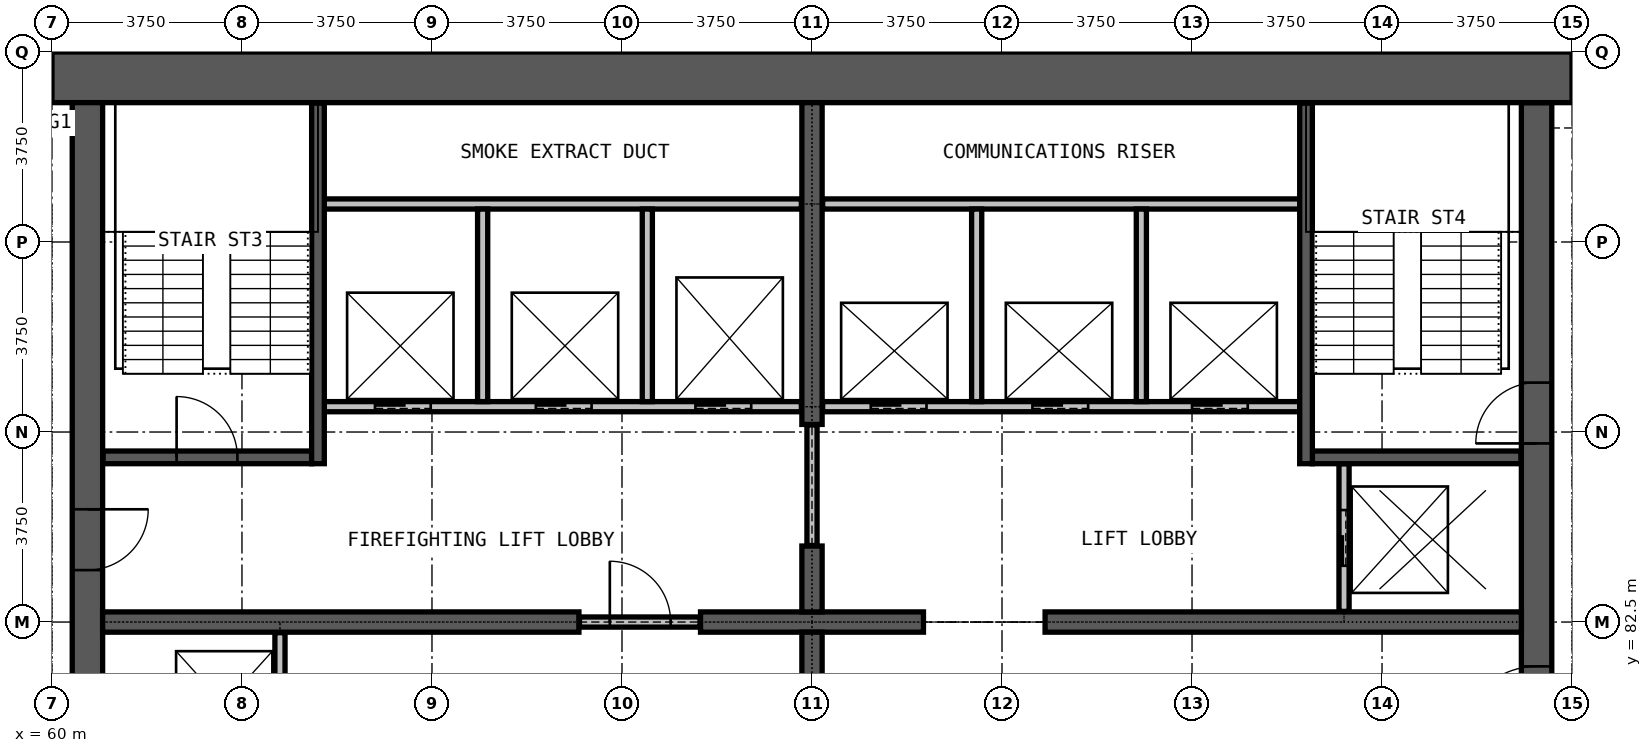
"""IFC4 building model, lengths in metres.
Left out: names, types, materials, properties, quantities, classifications, styles, units other than length and angle.
Written with IfcOpenShell. Run it as: python <this file> out.ifc"""

import sys

from ifc_helpers import new_model, si_unit, direction, frame, frame_2d, origin, place, context, subcontext, project, spatial, rectangle, extrude, element, fill, save


model = new_model("IFC4")
c1 = context("Model", 3, precision=1e-05, world=origin(), true_north=direction((0.0, 1.0)))
c2 = subcontext(c1, "Body", "Model", "MODEL_VIEW")
j1 = project(units=[si_unit("LENGTHUNIT", "METRE"), si_unit("PLANEANGLEUNIT", "RADIAN")], contexts=[c1])
p1 = place(None, origin())
s1 = spatial("IfcSite", under=j1, at=p1, CompositionType="ELEMENT")
p2 = place(p1, origin())
s2 = spatial("IfcBuilding", under=s1, at=p2, CompositionType="ELEMENT")
p3 = place(p2, frame((0.0, 0.0, 246.3)))
s3 = spatial("IfcBuildingStorey", under=s2, at=p3, CompositionType="ELEMENT", Elevation=246.3)
p4 = place(p3, frame((89.3, 72.25, 0.0), z_axis=(0.0, 0.0, 1.0), x_axis=(0.0, 1.0, 0.0)))
e1 = element("IfcWall", 1, at=p4, inside=s3, PredefinedType="SHEAR", context=c2, shape_type="SweptSolid", body=[
    extrude(rectangle(XDim=20.5, YDim=0.6, at=frame_2d((10.25, 0.0))), origin(), (0.0, 0.0, 1.0), 3.6),
])
p5 = place(p4, frame((0.275, 0.0, 0.0)))
e2 = element("IfcOpeningElement", 2, at=p5, cuts=e1, PredefinedType="OPENING", context=c2, shape_type="SweptSolid", body=[
    extrude(rectangle(XDim=1.2, YDim=2.2, at=frame_2d((0.6, 1.1))), frame((0.0, 0.31, 0.0), z_axis=(0.0, -1.0, 0.0), x_axis=(1.0, 0.0, 0.0)), (0.0, 0.0, 1.0), 0.62),
])
p6 = place(p4, frame((13.775, 0.0, 0.0)))
e3 = element("IfcOpeningElement", 3, at=p6, cuts=e1, PredefinedType="OPENING", context=c2, shape_type="SweptSolid", body=[
    extrude(rectangle(XDim=1.2, YDim=2.2, at=frame_2d((0.6, 1.1))), frame((0.0, 0.31, 0.0), z_axis=(0.0, -1.0, 0.0), x_axis=(1.0, 0.0, 0.0)), (0.0, 0.0, 1.0), 0.62),
])
p7 = place(p4, frame((7.875, 0.0, 0.0)))
e4 = element("IfcOpeningElement", 4, at=p7, cuts=e1, PredefinedType="OPENING", context=c2, shape_type="SweptSolid", body=[
    extrude(rectangle(XDim=1.5, YDim=2.2, at=frame_2d((0.75, 1.1))), frame((0.0, 0.31, 0.0), z_axis=(0.0, -1.0, 0.0), x_axis=(1.0, 0.0, 0.0)), (0.0, 0.0, 1.0), 0.62),
])
p8 = place(p3, frame((90.0, 93.25, 0.0), z_axis=(0.0, 0.0, 1.0), x_axis=(-1.0, 0.0, 0.0)))
e5 = element("IfcWall", 5, at=p8, inside=s3, PredefinedType="SHEAR", context=c2, shape_type="SweptSolid", body=[
    extrude(rectangle(XDim=30.0, YDim=1.0, at=frame_2d((15.0, 0.0))), origin(), (0.0, 0.0, 1.0), 3.6),
])
p9 = place(p3, frame((60.7, 92.75, 0.0), z_axis=(0.0, 0.0, 1.0), x_axis=(0.0, -1.0, 0.0)))
e6 = element("IfcWall", 6, at=p9, inside=s3, PredefinedType="SHEAR", context=c2, shape_type="SweptSolid", body=[
    extrude(rectangle(XDim=20.5, YDim=0.6, at=frame_2d((10.25, 0.0))), origin(), (0.0, 0.0, 1.0), 3.6),
])
p10 = place(p9, frame((19.025, 0.0, 0.0)))
e7 = element("IfcOpeningElement", 7, at=p10, cuts=e6, PredefinedType="OPENING", context=c2, shape_type="SweptSolid", body=[
    extrude(rectangle(XDim=1.2, YDim=2.2, at=frame_2d((0.6, 1.1))), frame((0.0, 0.31, 0.0), z_axis=(0.0, -1.0, 0.0), x_axis=(1.0, 0.0, 0.0)), (0.0, 0.0, 1.0), 0.62),
])
p11 = place(p9, frame((8.025, 0.0, 0.0)))
e8 = element("IfcOpeningElement", 8, at=p11, cuts=e6, PredefinedType="OPENING", context=c2, shape_type="SweptSolid", body=[
    extrude(rectangle(XDim=1.2, YDim=2.2, at=frame_2d((0.6, 1.1))), frame((0.0, 0.31, 0.0), z_axis=(0.0, -1.0, 0.0), x_axis=(1.0, 0.0, 0.0)), (0.0, 0.0, 1.0), 0.62),
])
p12 = place(p3, frame((61.0, 82.5, 0.0), z_axis=(0.0, 0.0, 1.0), x_axis=(1.0, 0.0, 0.0)))
e9 = element("IfcWall", 9, at=p12, inside=s3, PredefinedType="SHEAR", context=c2, shape_type="SweptSolid", body=[
    extrude(rectangle(XDim=9.4, YDim=0.4, at=frame_2d((4.7, 0.0))), origin(), (0.0, 0.0, 1.0), 3.6),
])
p13 = place(p3, frame((72.8, 82.5, 0.0), z_axis=(0.0, 0.0, 1.0), x_axis=(1.0, 0.0, 0.0)))
e10 = element("IfcWall", 10, at=p13, inside=s3, PredefinedType="SHEAR", context=c2, shape_type="SweptSolid", body=[
    extrude(rectangle(XDim=4.4, YDim=0.4, at=frame_2d((2.2, 0.0))), origin(), (0.0, 0.0, 1.0), 3.6),
])
p14 = place(p3, frame((79.6, 82.5, 0.0), z_axis=(0.0, 0.0, 1.0), x_axis=(1.0, 0.0, 0.0)))
e11 = element("IfcWall", 11, at=p14, inside=s3, PredefinedType="SHEAR", context=c2, shape_type="SweptSolid", body=[
    extrude(rectangle(XDim=9.4, YDim=0.4, at=frame_2d((4.7, 0.0))), origin(), (0.0, 0.0, 1.0), 3.6),
])
for number, where, z_axis, x_axis in (
    (12, (75.0, 81.0, 0.0), (0.0, 0.0, 1.0), (0.0, 1.0, 0.0)),
    (13, (75.0, 82.7, 0.0), (0.0, 0.0, 1.0), (0.0, 1.0, 0.0)),
):
    element("IfcWall", number, at=place(p3, frame(where, z_axis=z_axis, x_axis=x_axis)), inside=s3, PredefinedType="SHEAR", context=c2, shape_type="SweptSolid", body=[
        extrude(rectangle(XDim=1.3, YDim=0.4, at=frame_2d((0.65, 0.0))), origin(), (0.0, 0.0, 1.0), 3.6),
    ])
p15 = place(p3, frame((75.0, 86.4, 0.0), z_axis=(0.0, 0.0, 1.0), x_axis=(0.0, 1.0, 0.0)))
e14 = element("IfcWall", 14, at=p15, inside=s3, PredefinedType="SHEAR", context=c2, shape_type="SweptSolid", body=[
    extrude(rectangle(XDim=6.35, YDim=0.4, at=frame_2d((3.175, 0.0))), origin(), (0.0, 0.0, 1.0), 3.6),
])
p16 = place(p3, frame((70.41, 82.5, 0.0), z_axis=(0.0, 0.0, 1.0), x_axis=(1.0, 0.0, 0.0)))
e15 = element("IfcWall", 15, at=p16, inside=s3, PredefinedType="PARTITIONING", context=c2, shape_type="SweptSolid", body=[
    extrude(rectangle(XDim=2.38, YDim=0.2, at=frame_2d((1.19, 0.0))), origin(), (0.0, 0.0, 1.0), 2.4),
])
p17 = place(p16, frame((0.6, 0.0, 0.0)))
e16 = element("IfcOpeningElement", 16, at=p17, cuts=e15, PredefinedType="OPENING", context=c2, shape_type="SweptSolid", body=[
    extrude(rectangle(XDim=1.2, YDim=2.2, at=frame_2d((0.6, 1.1))), frame((0.0, 0.11, 0.0), z_axis=(0.0, -1.0, 0.0), x_axis=(1.0, 0.0, 0.0)), (0.0, 0.0, 1.0), 0.22),
])
p18 = place(p3, frame((75.0, 84.01, 0.0), z_axis=(0.0, 0.0, 1.0), x_axis=(0.0, 1.0, 0.0)))
e17 = element("IfcWall", 17, at=p18, inside=s3, PredefinedType="PARTITIONING", context=c2, shape_type="SweptSolid", body=[
    extrude(rectangle(XDim=2.38, YDim=0.2, at=frame_2d((1.19, 0.0))), origin(), (0.0, 0.0, 1.0), 2.4),
])
p19 = place(p3, frame((65.375, 86.75, 0.0), z_axis=(0.0, 0.0, 1.0), x_axis=(1.0, 0.0, 0.0)))
e18 = element("IfcWall", 18, at=p19, inside=s3, PredefinedType="PARTITIONING", context=c2, shape_type="SweptSolid", body=[
    extrude(rectangle(XDim=9.415, YDim=0.2, at=frame_2d((4.708, 0.0))), origin(), (0.0, 0.0, 1.0), 3.3),
])
p20 = place(p19, frame((1.0, 0.0, 0.0)))
e19 = element("IfcOpeningElement", 19, at=p20, cuts=e18, PredefinedType="OPENING", context=c2, shape_type="SweptSolid", body=[
    extrude(rectangle(XDim=1.1, YDim=2.2, at=frame_2d((0.55, 1.1))), frame((0.0, 0.11, 0.0), z_axis=(0.0, -1.0, 0.0), x_axis=(1.0, 0.0, 0.0)), (0.0, 0.0, 1.0), 0.22),
])
p21 = place(p19, frame((4.175, 0.0, 0.0)))
e20 = element("IfcOpeningElement", 20, at=p21, cuts=e18, PredefinedType="OPENING", context=c2, shape_type="SweptSolid", body=[
    extrude(rectangle(XDim=1.1, YDim=2.2, at=frame_2d((0.55, 1.1))), frame((0.0, 0.11, 0.0), z_axis=(0.0, -1.0, 0.0), x_axis=(1.0, 0.0, 0.0)), (0.0, 0.0, 1.0), 0.22),
])
p22 = place(p19, frame((7.325, 0.0, 0.0)))
e21 = element("IfcOpeningElement", 21, at=p22, cuts=e18, PredefinedType="OPENING", context=c2, shape_type="SweptSolid", body=[
    extrude(rectangle(XDim=1.1, YDim=2.2, at=frame_2d((0.55, 1.1))), frame((0.0, 0.11, 0.0), z_axis=(0.0, -1.0, 0.0), x_axis=(1.0, 0.0, 0.0)), (0.0, 0.0, 1.0), 0.22),
])
p23 = place(p3, frame((75.21, 86.75, 0.0), z_axis=(0.0, 0.0, 1.0), x_axis=(1.0, 0.0, 0.0)))
e22 = element("IfcWall", 22, at=p23, inside=s3, PredefinedType="PARTITIONING", context=c2, shape_type="SweptSolid", body=[
    extrude(rectangle(XDim=9.415, YDim=0.2, at=frame_2d((4.708, 0.0))), origin(), (0.0, 0.0, 1.0), 3.3),
])
p24 = place(p23, frame((0.95, 0.0, 0.0)))
e23 = element("IfcOpeningElement", 23, at=p24, cuts=e22, PredefinedType="OPENING", context=c2, shape_type="SweptSolid", body=[
    extrude(rectangle(XDim=1.1, YDim=2.2, at=frame_2d((0.55, 1.1))), frame((0.0, 0.11, 0.0), z_axis=(0.0, -1.0, 0.0), x_axis=(1.0, 0.0, 0.0)), (0.0, 0.0, 1.0), 0.22),
])
p25 = place(p23, frame((4.14, 0.0, 0.0)))
e24 = element("IfcOpeningElement", 24, at=p25, cuts=e22, PredefinedType="OPENING", context=c2, shape_type="SweptSolid", body=[
    extrude(rectangle(XDim=1.1, YDim=2.2, at=frame_2d((0.55, 1.1))), frame((0.0, 0.11, 0.0), z_axis=(0.0, -1.0, 0.0), x_axis=(1.0, 0.0, 0.0)), (0.0, 0.0, 1.0), 0.22),
])
p26 = place(p23, frame((7.29, 0.0, 0.0)))
e25 = element("IfcOpeningElement", 25, at=p26, cuts=e22, PredefinedType="OPENING", context=c2, shape_type="SweptSolid", body=[
    extrude(rectangle(XDim=1.1, YDim=2.2, at=frame_2d((0.55, 1.1))), frame((0.0, 0.11, 0.0), z_axis=(0.0, -1.0, 0.0), x_axis=(1.0, 0.0, 0.0)), (0.0, 0.0, 1.0), 0.22),
])
for number, where, z_axis, x_axis in (
    (26, (65.375, 90.75, 0.0), (0.0, 0.0, 1.0), (1.0, 0.0, 0.0)),
    (27, (75.21, 90.75, 0.0), (0.0, 0.0, 1.0), (1.0, 0.0, 0.0)),
):
    element("IfcWall", number, at=place(p3, frame(where, z_axis=z_axis, x_axis=x_axis)), inside=s3, PredefinedType="PARTITIONING", context=c2, shape_type="SweptSolid", body=[
        extrude(rectangle(XDim=9.415, YDim=0.2, at=frame_2d((4.708, 0.0))), origin(), (0.0, 0.0, 1.0), 3.3),
    ])
p27 = place(p3, frame((64.5, 79.375, 0.0), z_axis=(0.0, 0.0, 1.0), x_axis=(0.0, 1.0, 0.0)))
e28 = element("IfcWall", 28, at=p27, inside=s3, PredefinedType="PARTITIONING", context=c2, shape_type="SweptSolid", body=[
    extrude(rectangle(XDim=2.915, YDim=0.2, at=frame_2d((1.458, 0.0))), origin(), (0.0, 0.0, 1.0), 3.3),
])
for number, where, z_axis, x_axis in (
    (29, (68.5, 86.85, 0.0), (0.0, 0.0, 1.0), (0.0, 1.0, 0.0)),
    (30, (71.75, 86.85, 0.0), (0.0, 0.0, 1.0), (0.0, 1.0, 0.0)),
    (31, (78.25, 86.85, 0.0), (0.0, 0.0, 1.0), (0.0, 1.0, 0.0)),
    (32, (81.5, 86.85, 0.0), (0.0, 0.0, 1.0), (0.0, 1.0, 0.0)),
):
    element("IfcWall", number, at=place(p3, frame(where, z_axis=z_axis, x_axis=x_axis)), inside=s3, PredefinedType="PARTITIONING", context=c2, shape_type="SweptSolid", body=[
        extrude(rectangle(XDim=3.8, YDim=0.2, at=frame_2d((1.9, 0.0))), origin(), (0.0, 0.0, 1.0), 3.3),
    ])
p28 = place(p3, frame((85.5, 82.71, 0.0), z_axis=(0.0, 0.0, 1.0), x_axis=(0.0, 1.0, 0.0)))
e33 = element("IfcWall", 33, at=p28, inside=s3, PredefinedType="PARTITIONING", context=c2, shape_type="SweptSolid", body=[
    extrude(rectangle(XDim=2.915, YDim=0.2, at=frame_2d((1.458, 0.0))), origin(), (0.0, 0.0, 1.0), 3.3),
])
p29 = place(p28, frame((0.9, 0.0, 0.0)))
e34 = element("IfcOpeningElement", 34, at=p29, cuts=e33, PredefinedType="OPENING", context=c2, shape_type="SweptSolid", body=[
    extrude(rectangle(XDim=1.1, YDim=2.2, at=frame_2d((0.55, 1.1))), frame((0.0, 0.11, 0.0), z_axis=(0.0, -1.0, 0.0), x_axis=(1.0, 0.0, 0.0)), (0.0, 0.0, 1.0), 0.22),
])
p30 = place(p3, frame((61.01, 85.75, 0.0), z_axis=(0.0, 0.0, 1.0), x_axis=(1.0, 0.0, 0.0)))
e35 = element("IfcWall", 35, at=p30, inside=s3, PredefinedType="PARTITIONING", context=c2, shape_type="SweptSolid", body=[
    extrude(rectangle(XDim=4.115, YDim=0.25, at=frame_2d((2.058, 0.0))), origin(), (0.0, 0.0, 1.0), 3.3),
])
p31 = place(p30, frame((1.45, 0.0, 0.0)))
e36 = element("IfcOpeningElement", 36, at=p31, cuts=e35, PredefinedType="OPENING", context=c2, shape_type="SweptSolid", body=[
    extrude(rectangle(XDim=1.2, YDim=2.2, at=frame_2d((0.6, 1.1))), frame((0.0, 0.135, 0.0), z_axis=(0.0, -1.0, 0.0), x_axis=(1.0, 0.0, 0.0)), (0.0, 0.0, 1.0), 0.27),
])
p32 = place(p3, frame((84.875, 85.75, 0.0), z_axis=(0.0, 0.0, 1.0), x_axis=(1.0, 0.0, 0.0)))
e37 = element("IfcWall", 37, at=p32, inside=s3, PredefinedType="PARTITIONING", context=c2, shape_type="SweptSolid", body=[
    extrude(rectangle(XDim=4.115, YDim=0.25, at=frame_2d((2.058, 0.0))), origin(), (0.0, 0.0, 1.0), 3.3),
])
for number, where, z_axis, x_axis in (
    (38, (65.25, 85.625, 0.0), (0.0, 0.0, 1.0), (0.0, 1.0, 0.0)),
    (39, (84.75, 85.625, 0.0), (0.0, 0.0, 1.0), (0.0, 1.0, 0.0)),
):
    element("IfcWall", number, at=place(p3, frame(where, z_axis=z_axis, x_axis=x_axis)), inside=s3, PredefinedType="PARTITIONING", context=c2, shape_type="SweptSolid", body=[
        extrude(rectangle(XDim=7.115, YDim=0.25, at=frame_2d((3.558, 0.0))), origin(), (0.0, 0.0, 1.0), 3.3),
    ])
p33 = place(p24, origin())
e40 = element("IfcDoor", 40, at=p33, inside=s3, OperationType="DOUBLE_DOOR_SLIDING", PredefinedType="DOOR", context=c2, shape_type="SweptSolid", body=[
    extrude(rectangle(XDim=1.1, YDim=2.2, at=frame_2d((0.55, 1.1))), frame((0.0, 0.025, 0.0), z_axis=(0.0, -1.0, 0.0), x_axis=(1.0, 0.0, 0.0)), (0.0, 0.0, 1.0), 0.05),
])
fill(e23, e40)
p34 = place(p25, origin())
e41 = element("IfcDoor", 41, at=p34, inside=s3, OperationType="DOUBLE_DOOR_SLIDING", PredefinedType="DOOR", context=c2, shape_type="SweptSolid", body=[
    extrude(rectangle(XDim=1.1, YDim=2.2, at=frame_2d((0.55, 1.1))), frame((0.0, 0.025, 0.0), z_axis=(0.0, -1.0, 0.0), x_axis=(1.0, 0.0, 0.0)), (0.0, 0.0, 1.0), 0.05),
])
fill(e24, e41)
p35 = place(p26, origin())
e42 = element("IfcDoor", 42, at=p35, inside=s3, OperationType="DOUBLE_DOOR_SLIDING", PredefinedType="DOOR", context=c2, shape_type="SweptSolid", body=[
    extrude(rectangle(XDim=1.1, YDim=2.2, at=frame_2d((0.55, 1.1))), frame((0.0, 0.025, 0.0), z_axis=(0.0, -1.0, 0.0), x_axis=(1.0, 0.0, 0.0)), (0.0, 0.0, 1.0), 0.05),
])
fill(e25, e42)
p36 = place(p20, origin())
e43 = element("IfcDoor", 43, at=p36, inside=s3, OperationType="DOUBLE_DOOR_SLIDING", PredefinedType="DOOR", context=c2, shape_type="SweptSolid", body=[
    extrude(rectangle(XDim=1.1, YDim=2.2, at=frame_2d((0.55, 1.1))), frame((0.0, 0.025, 0.0), z_axis=(0.0, -1.0, 0.0), x_axis=(1.0, 0.0, 0.0)), (0.0, 0.0, 1.0), 0.05),
])
fill(e19, e43)
p37 = place(p21, origin())
e44 = element("IfcDoor", 44, at=p37, inside=s3, OperationType="DOUBLE_DOOR_SLIDING", PredefinedType="DOOR", context=c2, shape_type="SweptSolid", body=[
    extrude(rectangle(XDim=1.1, YDim=2.2, at=frame_2d((0.55, 1.1))), frame((0.0, 0.025, 0.0), z_axis=(0.0, -1.0, 0.0), x_axis=(1.0, 0.0, 0.0)), (0.0, 0.0, 1.0), 0.05),
])
fill(e20, e44)
p38 = place(p22, origin())
e45 = element("IfcDoor", 45, at=p38, inside=s3, OperationType="DOUBLE_DOOR_SLIDING", PredefinedType="DOOR", context=c2, shape_type="SweptSolid", body=[
    extrude(rectangle(XDim=1.1, YDim=2.2, at=frame_2d((0.55, 1.1))), frame((0.0, 0.025, 0.0), z_axis=(0.0, -1.0, 0.0), x_axis=(1.0, 0.0, 0.0)), (0.0, 0.0, 1.0), 0.05),
])
fill(e21, e45)
p39 = place(p29, origin())
e46 = element("IfcDoor", 46, at=p39, inside=s3, OperationType="DOUBLE_DOOR_SLIDING", PredefinedType="DOOR", context=c2, shape_type="SweptSolid", body=[
    extrude(rectangle(XDim=1.1, YDim=2.2, at=frame_2d((0.55, 1.1))), frame((0.0, 0.025, 0.0), z_axis=(0.0, -1.0, 0.0), x_axis=(1.0, 0.0, 0.0)), (0.0, 0.0, 1.0), 0.05),
])
fill(e34, e46)
p40 = place(p17, origin())
e47 = element("IfcDoor", 47, at=p40, inside=s3, OperationType="SINGLE_SWING_LEFT", PredefinedType="DOOR", context=c2, shape_type="SweptSolid", body=[
    extrude(rectangle(XDim=1.2, YDim=2.2, at=frame_2d((0.6, 1.1))), frame((0.0, 0.025, 0.0), z_axis=(0.0, -1.0, 0.0), x_axis=(1.0, 0.0, 0.0)), (0.0, 0.0, 1.0), 0.05),
])
fill(e16, e47)
p41 = place(p31, origin())
e48 = element("IfcDoor", 48, at=p41, inside=s3, OperationType="SINGLE_SWING_LEFT", PredefinedType="DOOR", context=c2, shape_type="SweptSolid", body=[
    extrude(rectangle(XDim=1.2, YDim=2.2, at=frame_2d((0.6, 1.1))), frame((0.0, 0.025, 0.0), z_axis=(0.0, -1.0, 0.0), x_axis=(1.0, 0.0, 0.0)), (0.0, 0.0, 1.0), 0.05),
])
fill(e36, e48)
p42 = place(p6, origin())
e49 = element("IfcDoor", 49, at=p42, inside=s3, OperationType="SINGLE_SWING_RIGHT", PredefinedType="DOOR", context=c2, shape_type="SweptSolid", body=[
    extrude(rectangle(XDim=1.2, YDim=2.2, at=frame_2d((0.6, 1.1))), frame((0.0, 0.025, 0.0), z_axis=(0.0, -1.0, 0.0), x_axis=(1.0, 0.0, 0.0)), (0.0, 0.0, 1.0), 0.05),
])
fill(e3, e49)
p43 = place(p7, origin())
e50 = element("IfcDoor", 50, at=p43, inside=s3, OperationType="DOUBLE_DOOR_SINGLE_SWING", PredefinedType="DOOR", context=c2, shape_type="SweptSolid", body=[
    extrude(rectangle(XDim=1.5, YDim=2.2, at=frame_2d((0.75, 1.1))), frame((0.0, 0.025, 0.0), z_axis=(0.0, -1.0, 0.0), x_axis=(1.0, 0.0, 0.0)), (0.0, 0.0, 1.0), 0.05),
])
fill(e4, e50)
p44 = place(p11, origin())
e51 = element("IfcDoor", 51, at=p44, inside=s3, OperationType="SINGLE_SWING_RIGHT", PredefinedType="DOOR", context=c2, shape_type="SweptSolid", body=[
    extrude(rectangle(XDim=1.2, YDim=2.2, at=frame_2d((0.6, 1.1))), frame((0.0, 0.025, 0.0), z_axis=(0.0, -1.0, 0.0), x_axis=(1.0, 0.0, 0.0)), (0.0, 0.0, 1.0), 0.05),
])
fill(e8, e51)
save(model, sys.argv[1])
